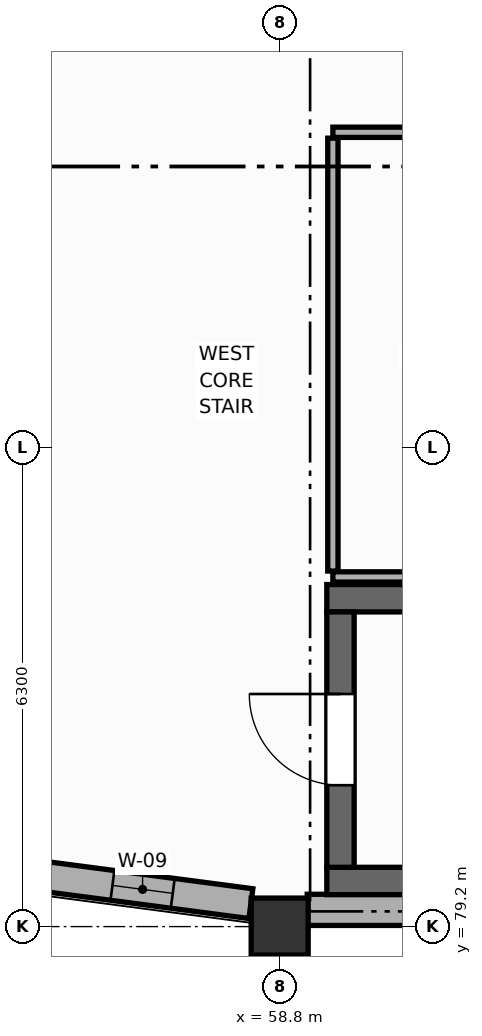
"""IFC4 building model, lengths in metres.
Left out: names, types, materials, properties, quantities, classifications, styles, units other than length and angle.
Written with IfcOpenShell. Run it as: python <this file> out.ifc"""

import sys

from ifc_helpers import new_model, si_unit, direction, frame, frame_2d, origin, origin_2d, place, context, subcontext, project, spatial, rectangle, extrude, element, fill, save


model = new_model("IFC4")
c1 = context("Model", 3, precision=1e-05, world=origin(), true_north=direction((0.0, 1.0)))
c2 = subcontext(c1, "Body", "Model", "MODEL_VIEW")
j1 = project(units=[si_unit("LENGTHUNIT", "METRE"), si_unit("PLANEANGLEUNIT", "RADIAN")], contexts=[c1])
p1 = place(None, origin())
s1 = spatial("IfcSite", under=j1, at=p1, CompositionType="ELEMENT")
p2 = place(p1, origin())
s2 = spatial("IfcBuilding", under=s1, at=p2, CompositionType="ELEMENT")
p3 = place(p2, frame((0.0, 0.0, 14.4)))
s3 = spatial("IfcBuildingStorey", under=s2, at=p3, CompositionType="ELEMENT", Elevation=14.4)
p4 = place(p3, frame((58.8, 79.2, 0.0), z_axis=(0.0, 0.0, 1.0), x_axis=(1.0, 0.0, 0.0)))
e1 = element("IfcColumn", 1, at=p4, inside=s3, PredefinedType="COLUMN", context=c2, shape_type="SweptSolid", body=[
    extrude(rectangle(XDim=0.75, YDim=0.75, at=origin_2d()), origin(), (0.0, 0.0, 1.0), 4.2),
])
p5 = place(p3, frame((66.833, 79.42, 0.0), z_axis=(0.0, 0.0, 1.0), x_axis=(-1.0, 0.0, 0.0)))
e2 = element("IfcWall", 2, at=p5, inside=s3, PredefinedType="STANDARD", context=c2, shape_type="SweptSolid", body=[
    extrude(rectangle(XDim=7.671, YDim=0.41, at=frame_2d((3.835, 0.0))), origin(), (0.0, 0.0, 1.0), 3.09),
])
p6 = place(p3, frame((55.572, 79.877, 0.0), z_axis=(0.0, 0.0, 1.0), x_axis=(0.991440991126, -0.130555586306, 0.0)))
e3 = element("IfcWall", 3, at=p6, inside=s3, PredefinedType="ELEMENTEDWALL", context=c2, shape_type="SweptSolid", body=[
    extrude(rectangle(XDim=2.874, YDim=0.395, at=frame_2d((1.437, 0.0))), origin(), (0.0, 0.0, 1.0), 3.09),
])
p7 = place(p6, frame((1.037, 0.0, 0.85)))
e4 = element("IfcOpeningElement", 4, at=p7, cuts=e3, PredefinedType="OPENING", context=c2, shape_type="SweptSolid", body=[
    extrude(rectangle(XDim=0.8, YDim=1.7, at=frame_2d((0.4, 0.85))), frame((0.0, 0.208, 0.0), z_axis=(0.0, -1.0, 0.0), x_axis=(1.0, 0.0, 0.0)), (0.0, 0.0, 1.0), 0.415),
])
for number, where, z_axis, x_axis in (
    (5, (59.42, 83.52, 0.0), (0.0, 0.0, 1.0), (1.0, 0.0, 0.0)),
    (6, (68.78, 79.8, 0.0), (0.0, 0.0, 1.0), (-1.0, 0.0, 0.0)),
):
    element("IfcWall", number, at=place(p3, frame(where, z_axis=z_axis, x_axis=x_axis)), inside=s3, PredefinedType="SHEAR", context=c2, shape_type="SweptSolid", body=[
        extrude(rectangle(XDim=9.36, YDim=0.36, at=frame_2d((4.68, 0.0))), origin(), (0.0, 0.0, 1.0), 3.96),
    ])
p8 = place(p3, frame((59.6, 79.98, 0.0), z_axis=(0.0, 0.0, 1.0), x_axis=(0.0, 1.0, 0.0)))
e7 = element("IfcWall", 7, at=p8, inside=s3, PredefinedType="SHEAR", context=c2, shape_type="SweptSolid", body=[
    extrude(rectangle(XDim=3.36, YDim=0.36, at=frame_2d((1.68, 0.0))), origin(), (0.0, 0.0, 1.0), 3.96),
])
p9 = place(p8, frame((1.08, 0.0, 0.0)))
e8 = element("IfcOpeningElement", 8, at=p9, cuts=e7, PredefinedType="OPENING", context=c2, shape_type="SweptSolid", body=[
    extrude(rectangle(XDim=1.2, YDim=2.2, at=frame_2d((0.6, 1.1))), frame((0.0, 0.19, 0.0), z_axis=(0.0, -1.0, 0.0), x_axis=(1.0, 0.0, 0.0)), (0.0, 0.0, 1.0), 0.38),
])
p10 = place(p3, frame((59.5, 89.65, 0.0), z_axis=(0.0, 0.0, 1.0), x_axis=(1.0, 0.0, 0.0)))
e9 = element("IfcWall", 9, at=p10, inside=s3, PredefinedType="PARTITIONING", context=c2, shape_type="SweptSolid", body=[
    extrude(rectangle(XDim=3.5, YDim=0.135, at=frame_2d((1.75, 0.0))), origin(), (0.0, 0.0, 1.0), 3.945),
])
p11 = place(p10, frame((1.275, 0.0, 0.0)))
e10 = element("IfcOpeningElement", 10, at=p11, cuts=e9, PredefinedType="OPENING", context=c2, shape_type="SweptSolid", body=[
    extrude(rectangle(XDim=0.95, YDim=2.15, at=frame_2d((0.475, 1.075))), frame((0.0, 0.077, 0.0), z_axis=(0.0, -1.0, 0.0), x_axis=(1.0, 0.0, 0.0)), (0.0, 0.0, 1.0), 0.155),
])
p12 = place(p3, frame((63.0, 83.8, 0.0), z_axis=(0.0, 0.0, 1.0), x_axis=(-1.0, 0.0, 0.0)))
e11 = element("IfcWall", 11, at=p12, inside=s3, PredefinedType="PARTITIONING", context=c2, shape_type="SweptSolid", body=[
    extrude(rectangle(XDim=3.5, YDim=0.135, at=frame_2d((1.75, 0.0))), origin(), (0.0, 0.0, 1.0), 3.945),
])
p13 = place(p3, frame((59.5, 83.877, 0.0), z_axis=(0.0, 0.0, 1.0), x_axis=(0.0, 1.0, 0.0)))
e12 = element("IfcWall", 12, at=p13, inside=s3, PredefinedType="PARTITIONING", context=c2, shape_type="SweptSolid", body=[
    extrude(rectangle(XDim=5.695, YDim=0.135, at=frame_2d((2.848, 0.0))), origin(), (0.0, 0.0, 1.0), 3.945),
])
p14 = place(p7, origin())
e13 = element("IfcWindow", 13, at=p14, inside=s3, PartitioningType="SINGLE_PANEL", PredefinedType="WINDOW", context=c2, shape_type="SweptSolid", body=[
    extrude(rectangle(XDim=0.8, YDim=1.7, at=frame_2d((0.4, 0.85))), frame((0.0, 0.03, 0.0), z_axis=(0.0, -1.0, 0.0), x_axis=(1.0, 0.0, 0.0)), (0.0, 0.0, 1.0), 0.06),
])
fill(e4, e13)
p15 = place(p9, origin())
e14 = element("IfcDoor", 14, at=p15, inside=s3, OperationType="SINGLE_SWING_RIGHT", PredefinedType="DOOR", context=c2, shape_type="SweptSolid", body=[
    extrude(rectangle(XDim=1.2, YDim=2.2, at=frame_2d((0.6, 1.1))), frame((0.0, 0.025, 0.0), z_axis=(0.0, -1.0, 0.0), x_axis=(1.0, 0.0, 0.0)), (0.0, 0.0, 1.0), 0.05),
])
fill(e8, e14)
save(model, sys.argv[1])
